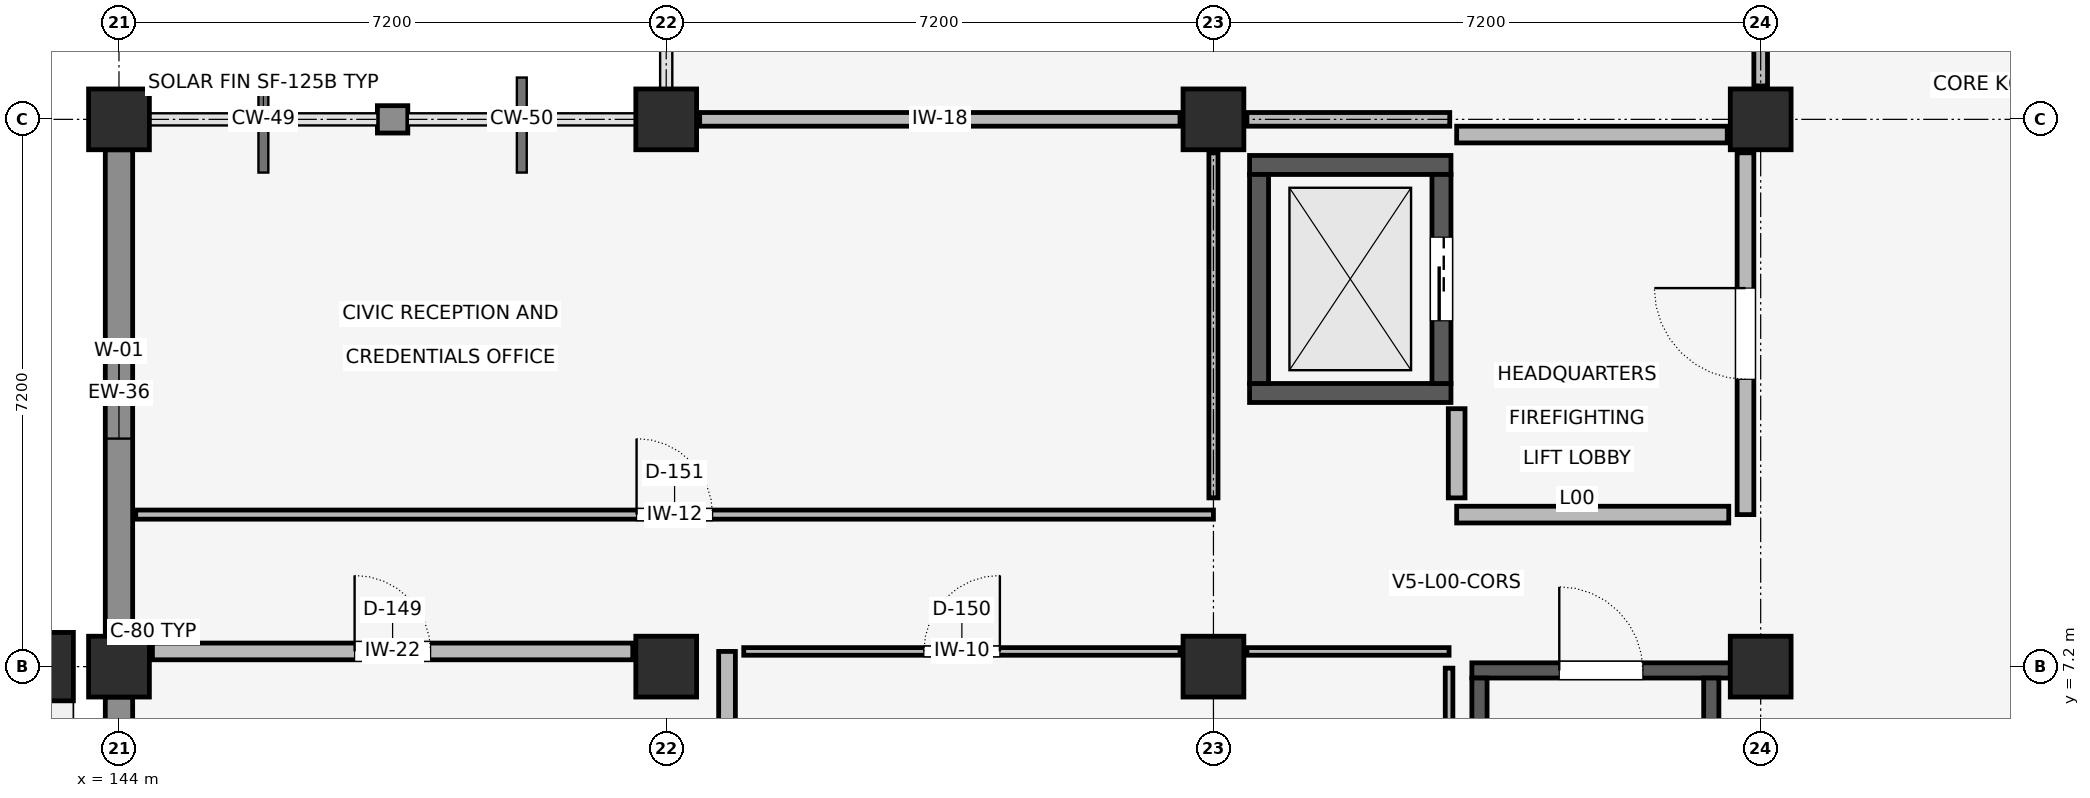
"""IFC4 building model, lengths in metres.
Left out: names, types, materials, properties, quantities, classifications, styles, units other than length and angle.
Written with IfcOpenShell. Run it as: python <this file> out.ifc"""

import sys

from ifc_helpers import new_model, si_unit, direction, frame, frame_2d, origin, origin_2d, place, context, subcontext, project, spatial, rectangle, extrude, element, fill, save


model = new_model("IFC4")
c1 = context("Model", 3, precision=1e-05, world=origin(), true_north=direction((0.0, 1.0)))
c2 = subcontext(c1, "Body", "Model", "MODEL_VIEW")
j1 = project(units=[si_unit("LENGTHUNIT", "METRE"), si_unit("PLANEANGLEUNIT", "RADIAN")], contexts=[c1])
p1 = place(None, origin())
s1 = spatial("IfcSite", under=j1, at=p1, CompositionType="ELEMENT")
p2 = place(p1, origin())
s2 = spatial("IfcBuilding", under=s1, at=p2, CompositionType="ELEMENT")
p3 = place(p2, origin())
s3 = spatial("IfcBuildingStorey", under=s2, at=p3, CompositionType="ELEMENT", Elevation=0.0)
for number, where, z_axis, x_axis in (
    (1, (144.0, 7.2, 0.0), (0.0, 0.0, 1.0), (1.0, 0.0, 0.0)),
    (2, (144.0, 14.4, 0.0), (0.0, 0.0, 1.0), (1.0, 0.0, 0.0)),
    (3, (151.2, 7.2, 0.0), (0.0, 0.0, 1.0), (1.0, 0.0, 0.0)),
    (4, (151.2, 14.4, 0.0), (0.0, 0.0, 1.0), (1.0, 0.0, 0.0)),
    (5, (158.4, 7.2, 0.0), (0.0, 0.0, 1.0), (1.0, 0.0, 0.0)),
    (6, (158.4, 14.4, 0.0), (0.0, 0.0, 1.0), (1.0, 0.0, 0.0)),
    (7, (165.6, 7.2, 0.0), (0.0, 0.0, 1.0), (1.0, 0.0, 0.0)),
    (8, (165.6, 14.4, 0.0), (0.0, 0.0, 1.0), (1.0, 0.0, 0.0)),
):
    element("IfcColumn", number, at=place(p3, frame(where, z_axis=z_axis, x_axis=x_axis)), inside=s3, PredefinedType="COLUMN", context=c2, shape_type="SweptSolid", body=[
        extrude(rectangle(XDim=0.8, YDim=0.8, at=origin_2d()), origin(), (0.0, 0.0, 1.0), 5.4),
    ])
p4 = place(p3, frame((143.1, 7.2, 0.0), z_axis=(0.0, 0.0, 1.0), x_axis=(1.0, 0.0, 0.0)))
e9 = element("IfcColumn", 9, at=p4, inside=s3, PredefinedType="PILASTER", context=c2, shape_type="SweptSolid", body=[
    extrude(rectangle(XDim=0.6, YDim=0.9, at=origin_2d()), origin(), (0.0, 0.0, 1.0), 5.4),
])
for number, where, z_axis, x_axis in (
    (10, (158.875, 10.8, 0.0), (0.0, 0.0, 1.0), (1.0, 0.0, 0.0)),
    (11, (158.875, 13.8, 0.0), (0.0, 0.0, 1.0), (1.0, 0.0, 0.0)),
):
    element("IfcWall", number, at=place(p3, frame(where, z_axis=z_axis, x_axis=x_axis)), inside=s3, PredefinedType="SHEAR", context=c2, shape_type="SweptSolid", body=[
        extrude(rectangle(XDim=2.65, YDim=0.25, at=frame_2d((1.325, 0.0))), origin(), (0.0, 0.0, 1.0), 5.15),
    ])
p5 = place(p3, frame((159.0, 10.925, 0.0), z_axis=(0.0, 0.0, 1.0), x_axis=(0.0, 1.0, 0.0)))
e12 = element("IfcWall", 12, at=p5, inside=s3, PredefinedType="SHEAR", context=c2, shape_type="SweptSolid", body=[
    extrude(rectangle(XDim=2.75, YDim=0.25, at=frame_2d((1.375, 0.0))), origin(), (0.0, 0.0, 1.0), 5.15),
])
p6 = place(p3, frame((161.4, 10.925, 0.0), z_axis=(0.0, 0.0, 1.0), x_axis=(0.0, 1.0, 0.0)))
e13 = element("IfcWall", 13, at=p6, inside=s3, PredefinedType="SHEAR", context=c2, shape_type="SweptSolid", body=[
    extrude(rectangle(XDim=2.75, YDim=0.25, at=frame_2d((1.375, 0.0))), origin(), (0.0, 0.0, 1.0), 5.15),
])
p7 = place(p6, frame((0.825, 0.0, 0.0)))
e14 = element("IfcOpeningElement", 14, at=p7, cuts=e13, PredefinedType="OPENING", context=c2, shape_type="SweptSolid", body=[
    extrude(rectangle(XDim=1.1, YDim=2.15, at=frame_2d((0.55, 1.075))), frame((0.0, 0.137, 0.0), z_axis=(0.0, -1.0, 0.0), x_axis=(1.0, 0.0, 0.0)), (0.0, 0.0, 1.0), 0.274),
])
p8 = place(p3, frame((161.8, 7.15, 0.0), z_axis=(0.0, 0.0, 1.0), x_axis=(1.0, 0.0, 0.0)))
e15 = element("IfcWall", 15, at=p8, inside=s3, PredefinedType="SHEAR", context=c2, shape_type="SweptSolid", body=[
    extrude(rectangle(XDim=3.4, YDim=0.2, at=frame_2d((1.7, 0.0))), origin(), (0.0, 0.0, 1.0), 5.15),
])
p9 = place(p8, frame((1.15, 0.0, 0.0)))
e16 = element("IfcOpeningElement", 16, at=p9, cuts=e15, PredefinedType="OPENING", context=c2, shape_type="SweptSolid", body=[
    extrude(rectangle(XDim=1.1, YDim=2.15, at=frame_2d((0.55, 1.075))), frame((0.0, 0.112, 0.0), z_axis=(0.0, -1.0, 0.0), x_axis=(1.0, 0.0, 0.0)), (0.0, 0.0, 1.0), 0.224),
])
for number, where, z_axis, x_axis in (
    (17, (161.9, 0.43, 0.0), (0.0, 0.0, 1.0), (0.0, 1.0, 0.0)),
    (18, (164.95, 0.43, 0.0), (0.0, 0.0, 1.0), (0.0, 1.0, 0.0)),
):
    element("IfcWall", number, at=place(p3, frame(where, z_axis=z_axis, x_axis=x_axis)), inside=s3, PredefinedType="SHEAR", context=c2, shape_type="SweptSolid", body=[
        extrude(rectangle(XDim=6.62, YDim=0.2, at=frame_2d((3.31, 0.0))), origin(), (0.0, 0.0, 1.0), 5.15),
    ])
p10 = place(p3, frame((144.0, 0.45, 0.0), z_axis=(0.0, 0.0, 1.0), x_axis=(0.0, 1.0, 0.0)))
e19 = element("IfcWall", 19, at=p10, inside=s3, PredefinedType="SOLIDWALL", context=c2, shape_type="SweptSolid", body=[
    extrude(rectangle(XDim=6.35, YDim=0.36, at=frame_2d((3.175, 0.0))), origin(), (0.0, 0.0, 1.0), 4.49),
])
p11 = place(p10, frame((2.175, 0.0, 0.85)))
e20 = element("IfcOpeningElement", 20, at=p11, cuts=e19, PredefinedType="OPENING", context=c2, shape_type="SweptSolid", body=[
    extrude(rectangle(XDim=2.0, YDim=1.85, at=frame_2d((1.0, 0.925))), frame((0.0, 0.192, 0.0), z_axis=(0.0, -1.0, 0.0), x_axis=(1.0, 0.0, 0.0)), (0.0, 0.0, 1.0), 0.384),
])
p12 = place(p3, frame((144.0, 7.6, 0.0), z_axis=(0.0, 0.0, 1.0), x_axis=(0.0, 1.0, 0.0)))
e21 = element("IfcWall", 21, at=p12, inside=s3, PredefinedType="SOLIDWALL", context=c2, shape_type="SweptSolid", body=[
    extrude(rectangle(XDim=6.4, YDim=0.36, at=frame_2d((3.2, 0.0))), origin(), (0.0, 0.0, 1.0), 4.54),
])
p13 = place(p12, frame((2.6, 0.0, 0.85)))
e22 = element("IfcOpeningElement", 22, at=p13, cuts=e21, PredefinedType="OPENING", context=c2, shape_type="SweptSolid", body=[
    extrude(rectangle(XDim=1.2, YDim=2.2, at=frame_2d((0.6, 1.1))), frame((0.0, 0.192, 0.0), z_axis=(0.0, -1.0, 0.0), x_axis=(1.0, 0.0, 0.0)), (0.0, 0.0, 1.0), 0.384),
])
p14 = place(p3, frame((147.4, 14.4, 0.0), z_axis=(0.0, 0.0, 1.0), x_axis=(1.0, 0.0, 0.0)))
e23 = element("IfcWall", 23, at=p14, inside=s3, PredefinedType="SOLIDWALL", context=c2, shape_type="SweptSolid", body=[
    extrude(rectangle(XDim=0.4, YDim=0.36, at=frame_2d((0.2, 0.0))), origin(), (0.0, 0.0, 1.0), 4.39),
])
p15 = place(p3, frame((165.4, 9.2, 0.0), z_axis=(0.0, 0.0, 1.0), x_axis=(0.0, 1.0, 0.0)))
e24 = element("IfcWall", 24, at=p15, inside=s3, PredefinedType="STANDARD", context=c2, shape_type="SweptSolid", body=[
    extrude(rectangle(XDim=4.76, YDim=0.22, at=frame_2d((2.38, 0.0))), origin(), (0.0, 0.0, 1.0), 4.538),
])
p16 = place(p15, frame((1.78, 0.0, 0.0)))
e25 = element("IfcOpeningElement", 25, at=p16, cuts=e24, PredefinedType="OPENING", context=c2, shape_type="SweptSolid", body=[
    extrude(rectangle(XDim=1.2, YDim=2.2, at=frame_2d((0.6, 1.1))), frame((0.0, 0.122, 0.0), z_axis=(0.0, -1.0, 0.0), x_axis=(1.0, 0.0, 0.0)), (0.0, 0.0, 1.0), 0.244),
])
p17 = place(p3, frame((161.6, 9.2, 0.0), z_axis=(0.0, 0.0, 1.0), x_axis=(1.0, 0.0, 0.0)))
e26 = element("IfcWall", 26, at=p17, inside=s3, PredefinedType="STANDARD", context=c2, shape_type="SweptSolid", body=[
    extrude(rectangle(XDim=3.58, YDim=0.22, at=frame_2d((1.79, 0.0))), origin(), (0.0, 0.0, 1.0), 5.12),
])
p18 = place(p3, frame((161.6, 14.2, 0.0), z_axis=(0.0, 0.0, 1.0), x_axis=(1.0, 0.0, 0.0)))
e27 = element("IfcWall", 27, at=p18, inside=s3, PredefinedType="STANDARD", context=c2, shape_type="SweptSolid", body=[
    extrude(rectangle(XDim=3.56, YDim=0.22, at=frame_2d((1.78, 0.0))), origin(), (0.0, 0.0, 1.0), 4.388),
])
p19 = place(p3, frame((161.6, 9.42, 0.0), z_axis=(0.0, 0.0, 1.0), x_axis=(0.0, 1.0, 0.0)))
e28 = element("IfcWall", 28, at=p19, inside=s3, PredefinedType="STANDARD", context=c2, shape_type="SweptSolid", body=[
    extrude(rectangle(XDim=1.174, YDim=0.22, at=frame_2d((0.587, 0.0))), origin(), (0.0, 0.0, 1.0), 5.12),
])
p20 = place(p3, frame((144.44, 7.4, 0.0), z_axis=(0.0, 0.0, 1.0), x_axis=(1.0, 0.0, 0.0)))
e29 = element("IfcWall", 29, at=p20, inside=s3, PredefinedType="STANDARD", context=c2, shape_type="SweptSolid", body=[
    extrude(rectangle(XDim=6.32, YDim=0.22, at=frame_2d((3.16, 0.0))), origin(), (0.0, 0.0, 1.0), 4.438),
])
p21 = place(p20, frame((2.66, 0.0, 0.0)))
e30 = element("IfcOpeningElement", 30, at=p21, cuts=e29, PredefinedType="OPENING", context=c2, shape_type="SweptSolid", body=[
    extrude(rectangle(XDim=1.0, YDim=2.15, at=frame_2d((0.5, 1.075))), frame((0.0, 0.122, 0.0), z_axis=(0.0, -1.0, 0.0), x_axis=(1.0, 0.0, 0.0)), (0.0, 0.0, 1.0), 0.244),
])
p22 = place(p3, frame((152.0, 0.0, 0.0), z_axis=(0.0, 0.0, 1.0), x_axis=(0.0, 1.0, 0.0)))
e31 = element("IfcWall", 31, at=p22, inside=s3, PredefinedType="STANDARD", context=c2, shape_type="SweptSolid", body=[
    extrude(rectangle(XDim=7.4, YDim=0.22, at=frame_2d((3.7, 0.0))), origin(), (0.0, 0.0, 1.0), 4.388),
])
p23 = place(p3, frame((152.22, 7.4, 0.0), z_axis=(0.0, 0.0, 1.0), x_axis=(1.0, 0.0, 0.0)))
e32 = element("IfcWall", 32, at=p23, inside=s3, PredefinedType="PARTITIONING", context=c2, shape_type="SweptSolid", body=[
    extrude(rectangle(XDim=5.74, YDim=0.1, at=frame_2d((2.87, 0.0))), origin(), (0.0, 0.0, 1.0), 4.388),
])
p24 = place(p23, frame((2.37, 0.0, 0.0)))
e33 = element("IfcOpeningElement", 33, at=p24, cuts=e32, PredefinedType="OPENING", context=c2, shape_type="SweptSolid", body=[
    extrude(rectangle(XDim=1.0, YDim=2.15, at=frame_2d((0.5, 1.075))), frame((0.0, 0.062, 0.0), z_axis=(0.0, -1.0, 0.0), x_axis=(1.0, 0.0, 0.0)), (0.0, 0.0, 1.0), 0.124),
])
p25 = place(p3, frame((158.84, 7.4, 0.0), z_axis=(0.0, 0.0, 1.0), x_axis=(1.0, 0.0, 0.0)))
e34 = element("IfcWall", 34, at=p25, inside=s3, PredefinedType="PARTITIONING", context=c2, shape_type="SweptSolid", body=[
    extrude(rectangle(XDim=2.66, YDim=0.1, at=frame_2d((1.33, 0.0))), origin(), (0.0, 0.0, 1.0), 5.12),
])
p26 = place(p3, frame((161.5, 0.22, 0.0), z_axis=(0.0, 0.0, 1.0), x_axis=(0.0, 1.0, 0.0)))
e35 = element("IfcWall", 35, at=p26, inside=s3, PredefinedType="PARTITIONING", context=c2, shape_type="SweptSolid", body=[
    extrude(rectangle(XDim=6.96, YDim=0.1, at=frame_2d((3.48, 0.0))), origin(), (0.0, 0.0, 1.0), 5.12),
])
p27 = place(p3, frame((144.22, 9.2, 0.0), z_axis=(0.0, 0.0, 1.0), x_axis=(1.0, 0.0, 0.0)))
e36 = element("IfcWall", 36, at=p27, inside=s3, PredefinedType="PARTITIONING", context=c2, shape_type="SweptSolid", body=[
    extrude(rectangle(XDim=14.18, YDim=0.12, at=frame_2d((7.09, 0.0))), origin(), (0.0, 0.0, 1.0), 4.488),
])
p28 = place(p27, frame((6.59, 0.0, 0.0)))
e37 = element("IfcOpeningElement", 37, at=p28, cuts=e36, PredefinedType="OPENING", context=c2, shape_type="SweptSolid", body=[
    extrude(rectangle(XDim=1.0, YDim=2.15, at=frame_2d((0.5, 1.075))), frame((0.0, 0.072, 0.0), z_axis=(0.0, -1.0, 0.0), x_axis=(1.0, 0.0, 0.0)), (0.0, 0.0, 1.0), 0.144),
])
p29 = place(p3, frame((158.4, 9.42, 0.0), z_axis=(0.0, 0.0, 1.0), x_axis=(0.0, 1.0, 0.0)))
e38 = element("IfcWall", 38, at=p29, inside=s3, PredefinedType="PARTITIONING", context=c2, shape_type="SweptSolid", body=[
    extrude(rectangle(XDim=4.54, YDim=0.12, at=frame_2d((2.27, 0.0))), origin(), (0.0, 0.0, 1.0), 4.488),
])
p30 = place(p3, frame((165.6, 14.84, 0.0), z_axis=(0.0, 0.0, 1.0), x_axis=(0.0, 1.0, 0.0)))
e39 = element("IfcWall", 39, at=p30, inside=s3, PredefinedType="PLUMBINGWALL", context=c2, shape_type="SweptSolid", body=[
    extrude(rectangle(XDim=6.32, YDim=0.18, at=frame_2d((3.16, 0.0))), origin(), (0.0, 0.0, 1.0), 4.488),
])
p31 = place(p30, frame((2.71, 0.0, 0.0)))
e40 = element("IfcOpeningElement", 40, at=p31, cuts=e39, PredefinedType="OPENING", context=c2, shape_type="SweptSolid", body=[
    extrude(rectangle(XDim=0.9, YDim=2.1, at=frame_2d((0.45, 1.05))), frame((0.0, 0.102, 0.0), z_axis=(0.0, -1.0, 0.0), x_axis=(1.0, 0.0, 0.0)), (0.0, 0.0, 1.0), 0.204),
])
p32 = place(p3, frame((151.64, 14.4, 0.0), z_axis=(0.0, 0.0, 1.0), x_axis=(1.0, 0.0, 0.0)))
e41 = element("IfcWall", 41, at=p32, inside=s3, PredefinedType="PLUMBINGWALL", context=c2, shape_type="SweptSolid", body=[
    extrude(rectangle(XDim=6.32, YDim=0.18, at=frame_2d((3.16, 0.0))), origin(), (0.0, 0.0, 1.0), 4.438),
])
p33 = place(p3, frame((158.84, 14.4, 0.0), z_axis=(0.0, 0.0, 1.0), x_axis=(1.0, 0.0, 0.0)))
e42 = element("IfcWall", 42, at=p33, inside=s3, PredefinedType="PLUMBINGWALL", context=c2, shape_type="SweptSolid", body=[
    extrude(rectangle(XDim=2.669, YDim=0.18, at=frame_2d((1.334, 0.0))), origin(), (0.0, 0.0, 1.0), 4.388),
])
p34 = place(p13, origin())
e43 = element("IfcWindow", 43, at=p34, inside=s3, PartitioningType="SINGLE_PANEL", PredefinedType="WINDOW", context=c2, shape_type="SweptSolid", body=[
    extrude(rectangle(XDim=1.2, YDim=2.2, at=frame_2d((0.6, 1.1))), frame((0.0, 0.03, 0.0), z_axis=(0.0, -1.0, 0.0), x_axis=(1.0, 0.0, 0.0)), (0.0, 0.0, 1.0), 0.06),
])
fill(e22, e43)
p35 = place(p9, origin())
e44 = element("IfcDoor", 44, at=p35, inside=s3, OperationType="SINGLE_SWING_LEFT", PredefinedType="DOOR", context=c2, shape_type="SweptSolid", body=[
    extrude(rectangle(XDim=1.1, YDim=2.15, at=frame_2d((0.55, 1.075))), frame((0.0, 0.025, 0.0), z_axis=(0.0, -1.0, 0.0), x_axis=(1.0, 0.0, 0.0)), (0.0, 0.0, 1.0), 0.05),
])
fill(e16, e44)
p36 = place(p7, origin())
e45 = element("IfcDoor", 45, at=p36, inside=s3, OperationType="SLIDING_TO_LEFT", PredefinedType="DOOR", context=c2, shape_type="SweptSolid", body=[
    extrude(rectangle(XDim=1.1, YDim=2.15, at=frame_2d((0.55, 1.075))), frame((0.0, 0.025, 0.0), z_axis=(0.0, -1.0, 0.0), x_axis=(1.0, 0.0, 0.0)), (0.0, 0.0, 1.0), 0.05),
])
fill(e14, e45)
p37 = place(p16, origin())
e46 = element("IfcDoor", 46, at=p37, inside=s3, OperationType="SINGLE_SWING_RIGHT", PredefinedType="DOOR", context=c2, shape_type="SweptSolid", body=[
    extrude(rectangle(XDim=1.2, YDim=2.2, at=frame_2d((0.6, 1.1))), frame((0.0, 0.025, 0.0), z_axis=(0.0, -1.0, 0.0), x_axis=(1.0, 0.0, 0.0)), (0.0, 0.0, 1.0), 0.05),
])
fill(e25, e46)
p38 = place(p21, origin())
e47 = element("IfcDoor", 47, at=p38, inside=s3, OperationType="SINGLE_SWING_LEFT", PredefinedType="DOOR", context=c2, shape_type="SweptSolid", body=[
    extrude(rectangle(XDim=1.0, YDim=2.15, at=frame_2d((0.5, 1.075))), frame((0.0, 0.025, 0.0), z_axis=(0.0, -1.0, 0.0), x_axis=(1.0, 0.0, 0.0)), (0.0, 0.0, 1.0), 0.05),
])
fill(e30, e47)
p39 = place(p24, origin())
e48 = element("IfcDoor", 48, at=p39, inside=s3, OperationType="SINGLE_SWING_RIGHT", PredefinedType="DOOR", context=c2, shape_type="SweptSolid", body=[
    extrude(rectangle(XDim=1.0, YDim=2.15, at=frame_2d((0.5, 1.075))), frame((0.0, 0.025, 0.0), z_axis=(0.0, -1.0, 0.0), x_axis=(1.0, 0.0, 0.0)), (0.0, 0.0, 1.0), 0.05),
])
fill(e33, e48)
p40 = place(p28, origin())
e49 = element("IfcDoor", 49, at=p40, inside=s3, OperationType="SINGLE_SWING_LEFT", PredefinedType="DOOR", context=c2, shape_type="SweptSolid", body=[
    extrude(rectangle(XDim=1.0, YDim=2.15, at=frame_2d((0.5, 1.075))), frame((0.0, 0.025, 0.0), z_axis=(0.0, -1.0, 0.0), x_axis=(1.0, 0.0, 0.0)), (0.0, 0.0, 1.0), 0.05),
])
fill(e37, e49)
save(model, sys.argv[1])
